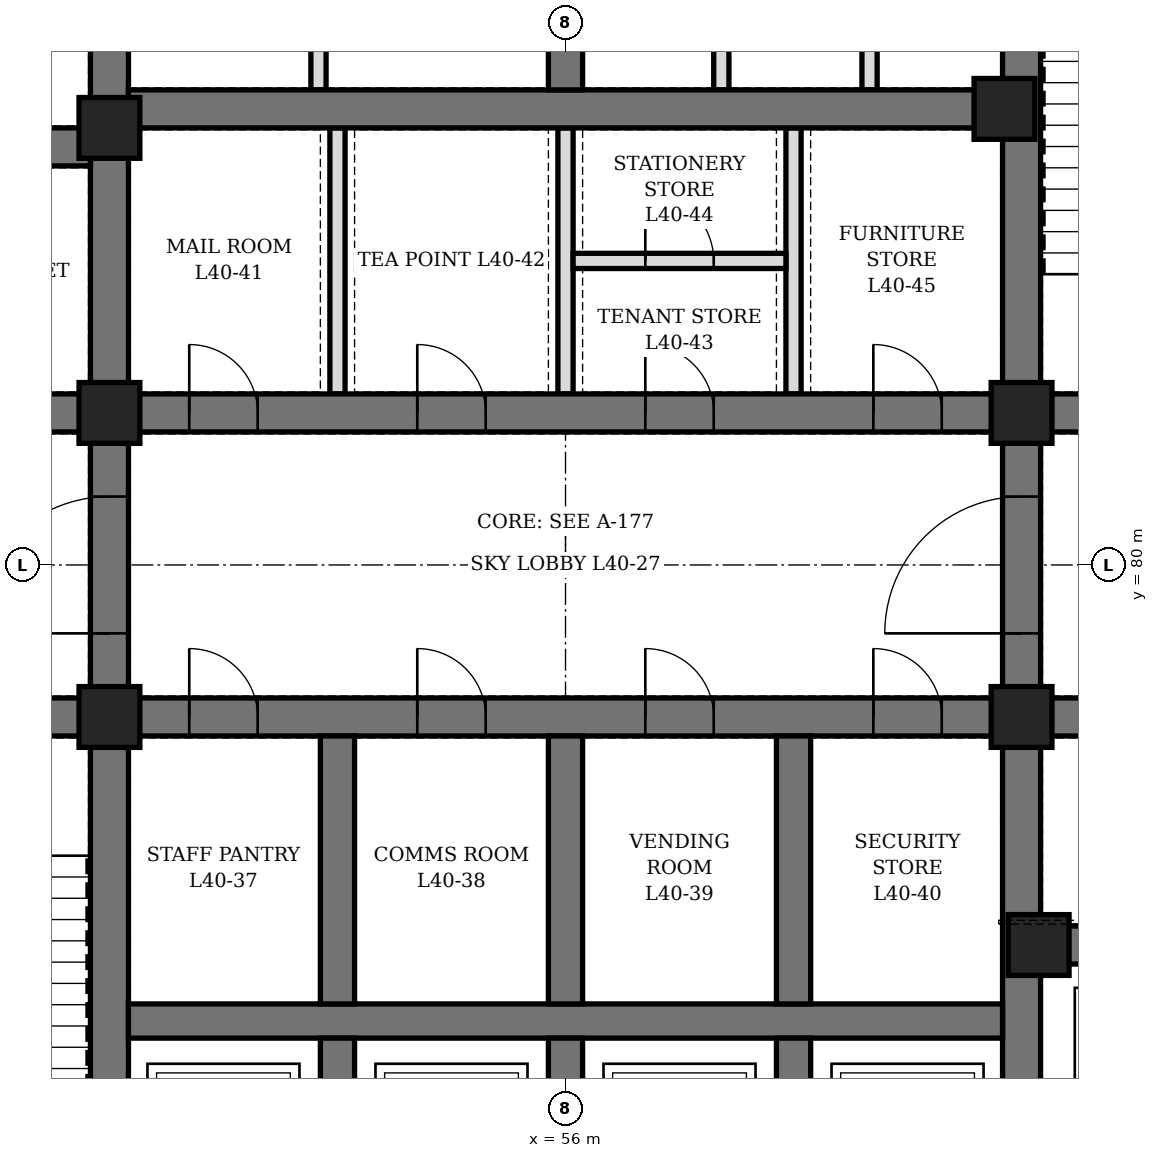
"""IFC4 building model, lengths in metres.
Left out: names, types, materials, properties, quantities, classifications, styles, units other than length and angle.
Written with IfcOpenShell. Run it as: python <this file> out.ifc"""

import sys

from ifc_helpers import new_model, si_unit, direction, frame, frame_2d, origin, origin_2d, place, context, subcontext, project, spatial, rectangle, hollow_rectangle, extrude, element, fill, save


model = new_model("IFC4")
c1 = context("Model", 3, precision=1e-05, world=origin(), true_north=direction((0.0, 1.0)))
c2 = subcontext(c1, "Body", "Model", "MODEL_VIEW")
j1 = project(units=[si_unit("LENGTHUNIT", "METRE"), si_unit("PLANEANGLEUNIT", "RADIAN")], contexts=[c1])
p1 = place(None, origin())
s1 = spatial("IfcSite", under=j1, at=p1, CompositionType="ELEMENT")
p2 = place(p1, origin())
s2 = spatial("IfcBuilding", under=s1, at=p2, CompositionType="ELEMENT")
p3 = place(p2, frame((0.0, 0.0, 181.3)))
s3 = spatial("IfcBuildingStorey", under=s2, at=p3, CompositionType="ELEMENT", Elevation=181.3)
p4 = place(p3, frame((50.0, 71.6, 0.0), z_axis=(0.0, 0.0, 1.0), x_axis=(0.0, 1.0, 0.0)))
e1 = element("IfcWall", 1, at=p4, inside=s3, PredefinedType="SHEAR", context=c2, shape_type="SweptSolid", body=[
    extrude(rectangle(XDim=16.8, YDim=0.5, at=frame_2d((8.4, 0.0))), origin(), (0.0, 0.0, 1.0), 4.2),
])
p5 = place(p4, frame((7.5, 0.0, 0.0)))
e2 = element("IfcOpeningElement", 2, at=p5, cuts=e1, PredefinedType="OPENING", context=c2, shape_type="SweptSolid", body=[
    extrude(rectangle(XDim=1.8, YDim=2.4, at=frame_2d((0.9, 1.2))), frame((0.0, 0.26, 0.0), z_axis=(0.0, -1.0, 0.0), x_axis=(1.0, 0.0, 0.0)), (0.0, 0.0, 1.0), 0.52),
])
p6 = place(p3, frame((62.0, 71.6, 0.0), z_axis=(0.0, 0.0, 1.0), x_axis=(0.0, 1.0, 0.0)))
e3 = element("IfcWall", 3, at=p6, inside=s3, PredefinedType="SHEAR", context=c2, shape_type="SweptSolid", body=[
    extrude(rectangle(XDim=16.8, YDim=0.5, at=frame_2d((8.4, 0.0))), origin(), (0.0, 0.0, 1.0), 4.2),
])
p7 = place(p6, frame((7.5, 0.0, 0.0)))
e4 = element("IfcOpeningElement", 4, at=p7, cuts=e3, PredefinedType="OPENING", context=c2, shape_type="SweptSolid", body=[
    extrude(rectangle(XDim=1.8, YDim=2.4, at=frame_2d((0.9, 1.2))), frame((0.0, 0.26, 0.0), z_axis=(0.0, -1.0, 0.0), x_axis=(1.0, 0.0, 0.0)), (0.0, 0.0, 1.0), 0.52),
])
p8 = place(p3, frame((44.6, 78.0, 0.0), z_axis=(0.0, 0.0, 1.0), x_axis=(1.0, 0.0, 0.0)))
e5 = element("IfcWall", 5, at=p8, inside=s3, PredefinedType="SHEAR", context=c2, shape_type="SweptSolid", body=[
    extrude(rectangle(XDim=5.15, YDim=0.5, at=frame_2d((2.575, 0.0))), origin(), (0.0, 0.0, 1.0), 4.2),
])
p9 = place(p8, frame((1.8, 0.0, 0.0)))
e6 = element("IfcOpeningElement", 6, at=p9, cuts=e5, PredefinedType="OPENING", context=c2, shape_type="SweptSolid", body=[
    extrude(rectangle(XDim=1.2, YDim=2.1, at=frame_2d((0.6, 1.05))), frame((0.0, 0.26, 0.0), z_axis=(0.0, -1.0, 0.0), x_axis=(1.0, 0.0, 0.0)), (0.0, 0.0, 1.0), 0.52),
])
p10 = place(p3, frame((44.6, 82.0, 0.0), z_axis=(0.0, 0.0, 1.0), x_axis=(1.0, 0.0, 0.0)))
e7 = element("IfcWall", 7, at=p10, inside=s3, PredefinedType="SHEAR", context=c2, shape_type="SweptSolid", body=[
    extrude(rectangle(XDim=5.15, YDim=0.5, at=frame_2d((2.575, 0.0))), origin(), (0.0, 0.0, 1.0), 4.2),
])
p11 = place(p10, frame((0.7, 0.0, 0.0)))
e8 = element("IfcOpeningElement", 8, at=p11, cuts=e7, PredefinedType="OPENING", context=c2, shape_type="SweptSolid", body=[
    extrude(rectangle(XDim=0.9, YDim=2.1, at=frame_2d((0.45, 1.05))), frame((0.0, 0.26, 0.0), z_axis=(0.0, -1.0, 0.0), x_axis=(1.0, 0.0, 0.0)), (0.0, 0.0, 1.0), 0.52),
])
p12 = place(p3, frame((44.6, 85.5, 0.0), z_axis=(0.0, 0.0, 1.0), x_axis=(1.0, 0.0, 0.0)))
e9 = element("IfcWall", 9, at=p12, inside=s3, PredefinedType="SHEAR", context=c2, shape_type="SweptSolid", body=[
    extrude(rectangle(XDim=5.15, YDim=0.5, at=frame_2d((2.575, 0.0))), origin(), (0.0, 0.0, 1.0), 4.2),
])
p13 = place(p12, frame((0.7, 0.0, 0.0)))
e10 = element("IfcOpeningElement", 10, at=p13, cuts=e9, PredefinedType="OPENING", context=c2, shape_type="SweptSolid", body=[
    extrude(rectangle(XDim=0.9, YDim=2.1, at=frame_2d((0.45, 1.05))), frame((0.0, 0.26, 0.0), z_axis=(0.0, -1.0, 0.0), x_axis=(1.0, 0.0, 0.0)), (0.0, 0.0, 1.0), 0.52),
])
p14 = place(p3, frame((62.25, 75.0, 0.0), z_axis=(0.0, 0.0, 1.0), x_axis=(1.0, 0.0, 0.0)))
e11 = element("IfcWall", 11, at=p14, inside=s3, PredefinedType="SHEAR", context=c2, shape_type="SweptSolid", body=[
    extrude(rectangle(XDim=5.15, YDim=0.5, at=frame_2d((2.575, 0.0))), origin(), (0.0, 0.0, 1.0), 4.2),
])
p15 = place(p14, frame((0.65, 0.0, 0.0)))
e12 = element("IfcOpeningElement", 12, at=p15, cuts=e11, PredefinedType="OPENING", context=c2, shape_type="SweptSolid", body=[
    extrude(rectangle(XDim=1.2, YDim=2.2, at=frame_2d((0.6, 1.1))), frame((0.0, 0.26, 0.0), z_axis=(0.0, -1.0, 0.0), x_axis=(1.0, 0.0, 0.0)), (0.0, 0.0, 1.0), 0.52),
])
p16 = place(p14, frame((3.4, 0.0, 0.0)))
e13 = element("IfcOpeningElement", 13, at=p16, cuts=e11, PredefinedType="OPENING", context=c2, shape_type="SweptSolid", body=[
    extrude(rectangle(XDim=1.2, YDim=2.2, at=frame_2d((0.6, 1.1))), frame((0.0, 0.26, 0.0), z_axis=(0.0, -1.0, 0.0), x_axis=(1.0, 0.0, 0.0)), (0.0, 0.0, 1.0), 0.52),
])
p17 = place(p3, frame((62.25, 78.0, 0.0), z_axis=(0.0, 0.0, 1.0), x_axis=(1.0, 0.0, 0.0)))
e14 = element("IfcWall", 14, at=p17, inside=s3, PredefinedType="SHEAR", context=c2, shape_type="SweptSolid", body=[
    extrude(rectangle(XDim=5.15, YDim=0.5, at=frame_2d((2.575, 0.0))), origin(), (0.0, 0.0, 1.0), 4.2),
])
p18 = place(p17, frame((2.15, 0.0, 0.0)))
e15 = element("IfcOpeningElement", 15, at=p18, cuts=e14, PredefinedType="OPENING", context=c2, shape_type="SweptSolid", body=[
    extrude(rectangle(XDim=1.2, YDim=2.1, at=frame_2d((0.6, 1.05))), frame((0.0, 0.26, 0.0), z_axis=(0.0, -1.0, 0.0), x_axis=(1.0, 0.0, 0.0)), (0.0, 0.0, 1.0), 0.52),
])
p19 = place(p3, frame((62.25, 82.0, 0.0), z_axis=(0.0, 0.0, 1.0), x_axis=(1.0, 0.0, 0.0)))
e16 = element("IfcWall", 16, at=p19, inside=s3, PredefinedType="SHEAR", context=c2, shape_type="SweptSolid", body=[
    extrude(rectangle(XDim=5.15, YDim=0.5, at=frame_2d((2.575, 0.0))), origin(), (0.0, 0.0, 1.0), 4.2),
])
p20 = place(p19, frame((2.15, 0.0, 0.0)))
e17 = element("IfcOpeningElement", 17, at=p20, cuts=e16, PredefinedType="OPENING", context=c2, shape_type="SweptSolid", body=[
    extrude(rectangle(XDim=1.2, YDim=2.1, at=frame_2d((0.6, 1.05))), frame((0.0, 0.26, 0.0), z_axis=(0.0, -1.0, 0.0), x_axis=(1.0, 0.0, 0.0)), (0.0, 0.0, 1.0), 0.52),
])
p21 = place(p3, frame((50.25, 78.0, 0.0), z_axis=(0.0, 0.0, 1.0), x_axis=(1.0, 0.0, 0.0)))
e18 = element("IfcWall", 18, at=p21, inside=s3, PredefinedType="SHEAR", context=c2, shape_type="SweptSolid", body=[
    extrude(rectangle(XDim=11.5, YDim=0.5, at=frame_2d((5.75, 0.0))), origin(), (0.0, 0.0, 1.0), 4.2),
])
p22 = place(p21, frame((0.8, 0.0, 0.0)))
e19 = element("IfcOpeningElement", 19, at=p22, cuts=e18, PredefinedType="OPENING", context=c2, shape_type="SweptSolid", body=[
    extrude(rectangle(XDim=0.9, YDim=2.1, at=frame_2d((0.45, 1.05))), frame((0.0, 0.26, 0.0), z_axis=(0.0, -1.0, 0.0), x_axis=(1.0, 0.0, 0.0)), (0.0, 0.0, 1.0), 0.52),
])
p23 = place(p21, frame((3.8, 0.0, 0.0)))
e20 = element("IfcOpeningElement", 20, at=p23, cuts=e18, PredefinedType="OPENING", context=c2, shape_type="SweptSolid", body=[
    extrude(rectangle(XDim=0.9, YDim=2.1, at=frame_2d((0.45, 1.05))), frame((0.0, 0.26, 0.0), z_axis=(0.0, -1.0, 0.0), x_axis=(1.0, 0.0, 0.0)), (0.0, 0.0, 1.0), 0.52),
])
p24 = place(p21, frame((6.8, 0.0, 0.0)))
e21 = element("IfcOpeningElement", 21, at=p24, cuts=e18, PredefinedType="OPENING", context=c2, shape_type="SweptSolid", body=[
    extrude(rectangle(XDim=0.9, YDim=2.1, at=frame_2d((0.45, 1.05))), frame((0.0, 0.26, 0.0), z_axis=(0.0, -1.0, 0.0), x_axis=(1.0, 0.0, 0.0)), (0.0, 0.0, 1.0), 0.52),
])
p25 = place(p21, frame((9.8, 0.0, 0.0)))
e22 = element("IfcOpeningElement", 22, at=p25, cuts=e18, PredefinedType="OPENING", context=c2, shape_type="SweptSolid", body=[
    extrude(rectangle(XDim=0.9, YDim=2.1, at=frame_2d((0.45, 1.05))), frame((0.0, 0.26, 0.0), z_axis=(0.0, -1.0, 0.0), x_axis=(1.0, 0.0, 0.0)), (0.0, 0.0, 1.0), 0.52),
])
p26 = place(p3, frame((50.25, 82.0, 0.0), z_axis=(0.0, 0.0, 1.0), x_axis=(1.0, 0.0, 0.0)))
e23 = element("IfcWall", 23, at=p26, inside=s3, PredefinedType="SHEAR", context=c2, shape_type="SweptSolid", body=[
    extrude(rectangle(XDim=11.5, YDim=0.5, at=frame_2d((5.75, 0.0))), origin(), (0.0, 0.0, 1.0), 4.2),
])
p27 = place(p26, frame((0.8, 0.0, 0.0)))
e24 = element("IfcOpeningElement", 24, at=p27, cuts=e23, PredefinedType="OPENING", context=c2, shape_type="SweptSolid", body=[
    extrude(rectangle(XDim=0.9, YDim=2.1, at=frame_2d((0.45, 1.05))), frame((0.0, 0.26, 0.0), z_axis=(0.0, -1.0, 0.0), x_axis=(1.0, 0.0, 0.0)), (0.0, 0.0, 1.0), 0.52),
])
p28 = place(p26, frame((3.8, 0.0, 0.0)))
e25 = element("IfcOpeningElement", 25, at=p28, cuts=e23, PredefinedType="OPENING", context=c2, shape_type="SweptSolid", body=[
    extrude(rectangle(XDim=0.9, YDim=2.1, at=frame_2d((0.45, 1.05))), frame((0.0, 0.26, 0.0), z_axis=(0.0, -1.0, 0.0), x_axis=(1.0, 0.0, 0.0)), (0.0, 0.0, 1.0), 0.52),
])
p29 = place(p26, frame((6.8, 0.0, 0.0)))
e26 = element("IfcOpeningElement", 26, at=p29, cuts=e23, PredefinedType="OPENING", context=c2, shape_type="SweptSolid", body=[
    extrude(rectangle(XDim=0.9, YDim=2.1, at=frame_2d((0.45, 1.05))), frame((0.0, 0.26, 0.0), z_axis=(0.0, -1.0, 0.0), x_axis=(1.0, 0.0, 0.0)), (0.0, 0.0, 1.0), 0.52),
])
p30 = place(p26, frame((9.8, 0.0, 0.0)))
e27 = element("IfcOpeningElement", 27, at=p30, cuts=e23, PredefinedType="OPENING", context=c2, shape_type="SweptSolid", body=[
    extrude(rectangle(XDim=0.9, YDim=2.1, at=frame_2d((0.45, 1.05))), frame((0.0, 0.26, 0.0), z_axis=(0.0, -1.0, 0.0), x_axis=(1.0, 0.0, 0.0)), (0.0, 0.0, 1.0), 0.52),
])
p31 = place(p3, frame((50.25, 86.0, 0.0), z_axis=(0.0, 0.0, 1.0), x_axis=(1.0, 0.0, 0.0)))
e28 = element("IfcWall", 28, at=p31, inside=s3, PredefinedType="SHEAR", context=c2, shape_type="SweptSolid", body=[
    extrude(rectangle(XDim=11.5, YDim=0.5, at=frame_2d((5.75, 0.0))), origin(), (0.0, 0.0, 1.0), 4.2),
])
p32 = place(p3, frame((50.25, 74.0, 0.0), z_axis=(0.0, 0.0, 1.0), x_axis=(1.0, 0.0, 0.0)))
e29 = element("IfcWall", 29, at=p32, inside=s3, PredefinedType="SHEAR", context=c2, shape_type="SweptSolid", body=[
    extrude(rectangle(XDim=11.5, YDim=0.45, at=frame_2d((5.75, 0.0))), origin(), (0.0, 0.0, 1.0), 4.2),
])
p33 = place(p3, frame((53.0, 71.6, 0.0), z_axis=(0.0, 0.0, 1.0), x_axis=(0.0, 1.0, 0.0)))
e30 = element("IfcWall", 30, at=p33, inside=s3, PredefinedType="SHEAR", context=c2, shape_type="SweptSolid", body=[
    extrude(rectangle(XDim=2.175, YDim=0.45, at=frame_2d((1.087, 0.0))), origin(), (0.0, 0.0, 1.0), 4.2),
])
p34 = place(p3, frame((53.0, 74.225, 0.0), z_axis=(0.0, 0.0, 1.0), x_axis=(0.0, 1.0, 0.0)))
e31 = element("IfcWall", 31, at=p34, inside=s3, PredefinedType="SHEAR", context=c2, shape_type="SweptSolid", body=[
    extrude(rectangle(XDim=3.525, YDim=0.45, at=frame_2d((1.762, 0.0))), origin(), (0.0, 0.0, 1.0), 4.2),
])
p35 = place(p3, frame((56.0, 71.6, 0.0), z_axis=(0.0, 0.0, 1.0), x_axis=(0.0, 1.0, 0.0)))
e32 = element("IfcWall", 32, at=p35, inside=s3, PredefinedType="SHEAR", context=c2, shape_type="SweptSolid", body=[
    extrude(rectangle(XDim=2.175, YDim=0.45, at=frame_2d((1.087, 0.0))), origin(), (0.0, 0.0, 1.0), 4.2),
])
p36 = place(p3, frame((56.0, 74.225, 0.0), z_axis=(0.0, 0.0, 1.0), x_axis=(0.0, 1.0, 0.0)))
e33 = element("IfcWall", 33, at=p36, inside=s3, PredefinedType="SHEAR", context=c2, shape_type="SweptSolid", body=[
    extrude(rectangle(XDim=3.525, YDim=0.45, at=frame_2d((1.762, 0.0))), origin(), (0.0, 0.0, 1.0), 4.2),
])
p37 = place(p3, frame((59.0, 71.6, 0.0), z_axis=(0.0, 0.0, 1.0), x_axis=(0.0, 1.0, 0.0)))
e34 = element("IfcWall", 34, at=p37, inside=s3, PredefinedType="SHEAR", context=c2, shape_type="SweptSolid", body=[
    extrude(rectangle(XDim=2.175, YDim=0.45, at=frame_2d((1.087, 0.0))), origin(), (0.0, 0.0, 1.0), 4.2),
])
p38 = place(p3, frame((59.0, 74.225, 0.0), z_axis=(0.0, 0.0, 1.0), x_axis=(0.0, 1.0, 0.0)))
e35 = element("IfcWall", 35, at=p38, inside=s3, PredefinedType="SHEAR", context=c2, shape_type="SweptSolid", body=[
    extrude(rectangle(XDim=3.525, YDim=0.45, at=frame_2d((1.762, 0.0))), origin(), (0.0, 0.0, 1.0), 4.2),
])
p39 = place(p3, frame((56.0, 86.25, 0.0), z_axis=(0.0, 0.0, 1.0), x_axis=(0.0, 1.0, 0.0)))
e36 = element("IfcWall", 36, at=p39, inside=s3, PredefinedType="SHEAR", context=c2, shape_type="SweptSolid", body=[
    extrude(rectangle(XDim=2.15, YDim=0.45, at=frame_2d((1.075, 0.0))), origin(), (0.0, 0.0, 1.0), 4.2),
])
for number, where, z_axis, x_axis in (
    (37, (50.0, 78.0, 0.0), (0.0, 0.0, 1.0), (1.0, 0.0, 0.0)),
    (38, (50.0, 82.0, 0.0), (0.0, 0.0, 1.0), (1.0, 0.0, 0.0)),
    (39, (50.0, 85.75, 0.0), (0.0, 0.0, 1.0), (1.0, 0.0, 0.0)),
    (40, (61.775, 86.0, 0.0), (0.0, 0.0, 1.0), (1.0, 0.0, 0.0)),
    (41, (62.0, 78.0, 0.0), (0.0, 0.0, 1.0), (1.0, 0.0, 0.0)),
    (42, (62.0, 82.0, 0.0), (0.0, 0.0, 1.0), (1.0, 0.0, 0.0)),
    (43, (62.225, 75.0, 0.0), (0.0, 0.0, 1.0), (1.0, 0.0, 0.0)),
):
    element("IfcColumn", number, at=place(p3, frame(where, z_axis=z_axis, x_axis=x_axis)), inside=s3, PredefinedType="COLUMN", context=c2, shape_type="SweptSolid", body=[
        extrude(hollow_rectangle(XDim=0.8, YDim=0.8, WallThickness=0.1, at=origin_2d()), origin(), (0.0, 0.0, 1.0), 4.2),
    ])
p40 = place(p3, frame((52.75, 86.25, 0.0), z_axis=(0.0, 0.0, 1.0), x_axis=(0.0, 1.0, 0.0)))
e44 = element("IfcWall", 44, at=p40, inside=s3, PredefinedType="PARTITIONING", context=c2, shape_type="SweptSolid", body=[
    extrude(rectangle(XDim=2.15, YDim=0.2, at=frame_2d((1.075, 0.0))), origin(), (0.0, 0.0, 1.0), 4.04),
])
p41 = place(p3, frame((60.0, 86.25, 0.0), z_axis=(0.0, 0.0, 1.0), x_axis=(0.0, 1.0, 0.0)))
e45 = element("IfcWall", 45, at=p41, inside=s3, PredefinedType="PARTITIONING", context=c2, shape_type="SweptSolid", body=[
    extrude(rectangle(XDim=2.15, YDim=0.2, at=frame_2d((1.075, 0.0))), origin(), (0.0, 0.0, 1.0), 4.04),
])
p42 = place(p41, frame((0.625, 0.0, 0.0)))
e46 = element("IfcOpeningElement", 46, at=p42, cuts=e45, PredefinedType="OPENING", context=c2, shape_type="SweptSolid", body=[
    extrude(rectangle(XDim=0.9, YDim=2.1, at=frame_2d((0.45, 1.05))), frame((0.0, 0.11, 0.0), z_axis=(0.0, -1.0, 0.0), x_axis=(1.0, 0.0, 0.0)), (0.0, 0.0, 1.0), 0.22),
])
p43 = place(p3, frame((58.05, 86.25, 0.0), z_axis=(0.0, 0.0, 1.0), x_axis=(0.0, 1.0, 0.0)))
e47 = element("IfcWall", 47, at=p43, inside=s3, PredefinedType="PARTITIONING", context=c2, shape_type="SweptSolid", body=[
    extrude(rectangle(XDim=2.15, YDim=0.2, at=frame_2d((1.075, 0.0))), origin(), (0.0, 0.0, 1.0), 4.04),
])
p44 = place(p3, frame((53.0, 82.25, 0.0), z_axis=(0.0, 0.0, 1.0), x_axis=(0.0, 1.0, 0.0)))
e48 = element("IfcWall", 48, at=p44, inside=s3, PredefinedType="PARTITIONING", context=c2, shape_type="SweptSolid", body=[
    extrude(rectangle(XDim=3.5, YDim=0.2, at=frame_2d((1.75, 0.0))), origin(), (0.0, 0.0, 1.0), 4.04),
])
p45 = place(p3, frame((56.0, 82.25, 0.0), z_axis=(0.0, 0.0, 1.0), x_axis=(0.0, 1.0, 0.0)))
e49 = element("IfcWall", 49, at=p45, inside=s3, PredefinedType="PARTITIONING", context=c2, shape_type="SweptSolid", body=[
    extrude(rectangle(XDim=3.5, YDim=0.2, at=frame_2d((1.75, 0.0))), origin(), (0.0, 0.0, 1.0), 2.54),
])
p46 = place(p3, frame((59.0, 82.25, 0.0), z_axis=(0.0, 0.0, 1.0), x_axis=(0.0, 1.0, 0.0)))
e50 = element("IfcWall", 50, at=p46, inside=s3, PredefinedType="PARTITIONING", context=c2, shape_type="SweptSolid", body=[
    extrude(rectangle(XDim=3.5, YDim=0.2, at=frame_2d((1.75, 0.0))), origin(), (0.0, 0.0, 1.0), 4.04),
])
p47 = place(p3, frame((56.1, 84.0, 0.0), z_axis=(0.0, 0.0, 1.0), x_axis=(1.0, 0.0, 0.0)))
e51 = element("IfcWall", 51, at=p47, inside=s3, PredefinedType="PARTITIONING", context=c2, shape_type="SweptSolid", body=[
    extrude(rectangle(XDim=2.8, YDim=0.2, at=frame_2d((1.4, 0.0))), origin(), (0.0, 0.0, 1.0), 4.04),
])
p48 = place(p47, frame((0.95, 0.0, 0.0)))
e52 = element("IfcOpeningElement", 52, at=p48, cuts=e51, PredefinedType="OPENING", context=c2, shape_type="SweptSolid", body=[
    extrude(rectangle(XDim=0.9, YDim=2.1, at=frame_2d((0.45, 1.05))), frame((0.0, 0.11, 0.0), z_axis=(0.0, -1.0, 0.0), x_axis=(1.0, 0.0, 0.0)), (0.0, 0.0, 1.0), 0.22),
])
p49 = place(p22, origin())
e53 = element("IfcDoor", 53, at=p49, inside=s3, OperationType="SINGLE_SWING_LEFT", PredefinedType="DOOR", context=c2, shape_type="SweptSolid", body=[
    extrude(rectangle(XDim=0.9, YDim=2.1, at=frame_2d((0.45, 1.05))), frame((0.0, 0.25, 0.0), z_axis=(0.0, -1.0, 0.0), x_axis=(1.0, 0.0, 0.0)), (0.0, 0.0, 1.0), 0.5),
])
fill(e19, e53)
p50 = place(p23, origin())
e54 = element("IfcDoor", 54, at=p50, inside=s3, OperationType="SINGLE_SWING_LEFT", PredefinedType="DOOR", context=c2, shape_type="SweptSolid", body=[
    extrude(rectangle(XDim=0.9, YDim=2.1, at=frame_2d((0.45, 1.05))), frame((0.0, 0.25, 0.0), z_axis=(0.0, -1.0, 0.0), x_axis=(1.0, 0.0, 0.0)), (0.0, 0.0, 1.0), 0.5),
])
fill(e20, e54)
p51 = place(p24, origin())
e55 = element("IfcDoor", 55, at=p51, inside=s3, OperationType="SINGLE_SWING_LEFT", PredefinedType="DOOR", context=c2, shape_type="SweptSolid", body=[
    extrude(rectangle(XDim=0.9, YDim=2.1, at=frame_2d((0.45, 1.05))), frame((0.0, 0.25, 0.0), z_axis=(0.0, -1.0, 0.0), x_axis=(1.0, 0.0, 0.0)), (0.0, 0.0, 1.0), 0.5),
])
fill(e21, e55)
p52 = place(p25, origin())
e56 = element("IfcDoor", 56, at=p52, inside=s3, OperationType="SINGLE_SWING_LEFT", PredefinedType="DOOR", context=c2, shape_type="SweptSolid", body=[
    extrude(rectangle(XDim=0.9, YDim=2.1, at=frame_2d((0.45, 1.05))), frame((0.0, 0.25, 0.0), z_axis=(0.0, -1.0, 0.0), x_axis=(1.0, 0.0, 0.0)), (0.0, 0.0, 1.0), 0.5),
])
fill(e22, e56)
p53 = place(p27, origin())
e57 = element("IfcDoor", 57, at=p53, inside=s3, OperationType="SINGLE_SWING_LEFT", PredefinedType="DOOR", context=c2, shape_type="SweptSolid", body=[
    extrude(rectangle(XDim=0.9, YDim=2.1, at=frame_2d((0.45, 1.05))), frame((0.0, 0.25, 0.0), z_axis=(0.0, -1.0, 0.0), x_axis=(1.0, 0.0, 0.0)), (0.0, 0.0, 1.0), 0.5),
])
fill(e24, e57)
p54 = place(p28, origin())
e58 = element("IfcDoor", 58, at=p54, inside=s3, OperationType="SINGLE_SWING_LEFT", PredefinedType="DOOR", context=c2, shape_type="SweptSolid", body=[
    extrude(rectangle(XDim=0.9, YDim=2.1, at=frame_2d((0.45, 1.05))), frame((0.0, 0.25, 0.0), z_axis=(0.0, -1.0, 0.0), x_axis=(1.0, 0.0, 0.0)), (0.0, 0.0, 1.0), 0.5),
])
fill(e25, e58)
p55 = place(p29, origin())
e59 = element("IfcDoor", 59, at=p55, inside=s3, OperationType="SINGLE_SWING_LEFT", PredefinedType="DOOR", context=c2, shape_type="SweptSolid", body=[
    extrude(rectangle(XDim=0.9, YDim=2.1, at=frame_2d((0.45, 1.05))), frame((0.0, 0.25, 0.0), z_axis=(0.0, -1.0, 0.0), x_axis=(1.0, 0.0, 0.0)), (0.0, 0.0, 1.0), 0.5),
])
fill(e26, e59)
p56 = place(p48, origin())
e60 = element("IfcDoor", 60, at=p56, inside=s3, OperationType="SINGLE_SWING_LEFT", PredefinedType="DOOR", context=c2, shape_type="SweptSolid", body=[
    extrude(rectangle(XDim=0.9, YDim=2.1, at=frame_2d((0.45, 1.05))), frame((0.0, 0.1, 0.0), z_axis=(0.0, -1.0, 0.0), x_axis=(1.0, 0.0, 0.0)), (0.0, 0.0, 1.0), 0.199),
])
fill(e52, e60)
p57 = place(p30, origin())
e61 = element("IfcDoor", 61, at=p57, inside=s3, OperationType="SINGLE_SWING_LEFT", PredefinedType="DOOR", context=c2, shape_type="SweptSolid", body=[
    extrude(rectangle(XDim=0.9, YDim=2.1, at=frame_2d((0.45, 1.05))), frame((0.0, 0.25, 0.0), z_axis=(0.0, -1.0, 0.0), x_axis=(1.0, 0.0, 0.0)), (0.0, 0.0, 1.0), 0.5),
])
fill(e27, e61)
p58 = place(p5, origin())
e62 = element("IfcDoor", 62, at=p58, inside=s3, OperationType="DOUBLE_DOOR_SINGLE_SWING", PredefinedType="DOOR", context=c2, shape_type="SweptSolid", body=[
    extrude(rectangle(XDim=1.8, YDim=2.4, at=frame_2d((0.9, 1.2))), frame((0.0, 0.25, 0.0), z_axis=(0.0, -1.0, 0.0), x_axis=(1.0, 0.0, 0.0)), (0.0, 0.0, 1.0), 0.5),
])
fill(e2, e62)
p59 = place(p7, origin())
e63 = element("IfcDoor", 63, at=p59, inside=s3, OperationType="DOUBLE_DOOR_SINGLE_SWING", PredefinedType="DOOR", context=c2, shape_type="SweptSolid", body=[
    extrude(rectangle(XDim=1.8, YDim=2.4, at=frame_2d((0.9, 1.2))), frame((0.0, 0.25, 0.0), z_axis=(0.0, -1.0, 0.0), x_axis=(1.0, 0.0, 0.0)), (0.0, 0.0, 1.0), 0.5),
])
fill(e4, e63)
save(model, sys.argv[1])
